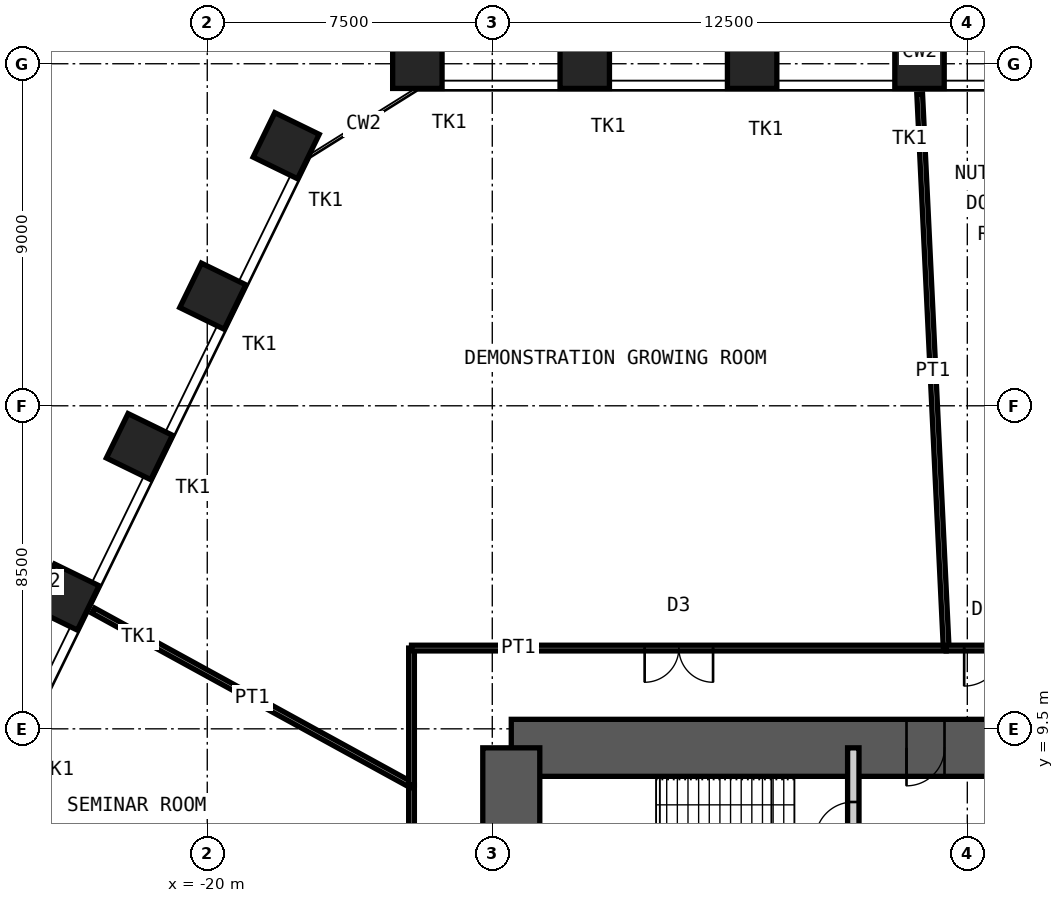
"""IFC4 building model, lengths in metres.
Left out: names, types, materials, properties, quantities, classifications, styles, units other than length and angle.
Written with IfcOpenShell. Run it as: python <this file> out.ifc"""

import sys

from ifc_helpers import new_model, si_unit, direction, frame, frame_2d, origin, origin_2d, place, context, subcontext, project, spatial, rectangle, hollow_rectangle, extrude, element, fill, save


model = new_model("IFC4")
c1 = context("Model", 3, precision=1e-05, world=origin(), true_north=direction((0.0, 1.0)))
c2 = subcontext(c1, "Body", "Model", "MODEL_VIEW")
j1 = project(units=[si_unit("LENGTHUNIT", "METRE"), si_unit("PLANEANGLEUNIT", "RADIAN")], contexts=[c1])
p1 = place(None, origin())
s1 = spatial("IfcSite", under=j1, at=p1, CompositionType="ELEMENT")
p2 = place(p1, origin())
s2 = spatial("IfcBuilding", under=s1, at=p2, CompositionType="ELEMENT")
p3 = place(p2, frame((0.0, 0.0, 92.0)))
s3 = spatial("IfcBuildingStorey", under=s2, at=p3, CompositionType="ELEMENT", Elevation=92.0)
for number, where, z_axis, x_axis in (
    (1, (-14.471, 27.0, 0.0), (0.0, 0.0, 1.0), (-1.0, 0.0, 0.0)),
    (2, (-10.067, 27.0, 0.0), (0.0, 0.0, 1.0), (-1.0, 0.0, 0.0)),
    (3, (-5.662, 27.0, 0.0), (0.0, 0.0, 1.0), (-1.0, 0.0, 0.0)),
    (4, (-1.258, 27.0, 0.0), (0.0, 0.0, 1.0), (-1.0, 0.0, 0.0)),
    (5, (-23.716, 12.966, 0.0), (0.0, 0.0, 1.0), (-0.438, -0.899, 0.0)),
    (6, (-21.785, 16.925, 0.0), (0.0, 0.0, 1.0), (-0.438, -0.899, 0.0)),
    (7, (-19.854, 20.884, 0.0), (0.0, 0.0, 1.0), (-0.438, -0.899, 0.0)),
    (8, (-17.924, 24.843, 0.0), (0.0, 0.0, 1.0), (-0.438, -0.899, 0.0)),
):
    element("IfcColumn", number, at=place(p3, frame(where, z_axis=z_axis, x_axis=x_axis)), inside=s3, PredefinedType="COLUMN", context=c2, shape_type="SweptSolid", body=[
        extrude(hollow_rectangle(XDim=1.3, YDim=1.3, WallThickness=0.1, at=origin_2d()), origin(), (0.0, 0.0, 1.0), 5.0),
    ])
p4 = place(p3, frame((-12.0, 9.0, 0.0), z_axis=(0.0, 0.0, 1.0), x_axis=(1.0, 0.0, 0.0)))
e9 = element("IfcWall", 9, at=p4, inside=s3, PredefinedType="SHEAR", context=c2, shape_type="SweptSolid", body=[
    extrude(rectangle(XDim=24.0, YDim=1.5, at=frame_2d((12.0, 0.0))), origin(), (0.0, 0.0, 1.0), 5.0),
])
p5 = place(p4, frame((10.4, 0.0, 0.0)))
e10 = element("IfcOpeningElement", 10, at=p5, cuts=e9, PredefinedType="OPENING", context=c2, shape_type="SweptSolid", body=[
    extrude(rectangle(XDim=1.0, YDim=2.1, at=frame_2d((0.5, 1.05))), frame((0.0, 0.76, 0.0), z_axis=(0.0, -1.0, 0.0), x_axis=(1.0, 0.0, 0.0)), (0.0, 0.0, 1.0), 1.52),
])
p6 = place(p4, frame((17.6, 0.0, 0.0)))
e11 = element("IfcOpeningElement", 11, at=p6, cuts=e9, PredefinedType="OPENING", context=c2, shape_type="SweptSolid", body=[
    extrude(rectangle(XDim=0.9, YDim=2.1, at=frame_2d((0.45, 1.05))), frame((0.0, 0.76, 0.0), z_axis=(0.0, -1.0, 0.0), x_axis=(1.0, 0.0, 0.0)), (0.0, 0.0, 1.0), 1.52),
])
p7 = place(p4, frame((21.9, 0.0, 0.0)))
e12 = element("IfcOpeningElement", 12, at=p7, cuts=e9, PredefinedType="OPENING", context=c2, shape_type="SweptSolid", body=[
    extrude(rectangle(XDim=0.9, YDim=2.1, at=frame_2d((0.45, 1.05))), frame((0.0, 0.76, 0.0), z_axis=(0.0, -1.0, 0.0), x_axis=(1.0, 0.0, 0.0)), (0.0, 0.0, 1.0), 1.52),
])
p8 = place(p3, frame((-12.0, -9.0, 0.0), z_axis=(0.0, 0.0, 1.0), x_axis=(0.0, 1.0, 0.0)))
e13 = element("IfcWall", 13, at=p8, inside=s3, PredefinedType="SHEAR", context=c2, shape_type="SweptSolid", body=[
    extrude(rectangle(XDim=18.0, YDim=1.5, at=frame_2d((9.0, 0.0))), origin(), (0.0, 0.0, 1.0), 5.0),
])
p9 = place(p8, frame((8.1, 0.0, 0.0)))
e14 = element("IfcOpeningElement", 14, at=p9, cuts=e13, PredefinedType="OPENING", context=c2, shape_type="SweptSolid", body=[
    extrude(rectangle(XDim=1.8, YDim=2.1, at=frame_2d((0.9, 1.05))), frame((0.0, 0.76, 0.0), z_axis=(0.0, -1.0, 0.0), x_axis=(1.0, 0.0, 0.0)), (0.0, 0.0, 1.0), 1.52),
])
p10 = place(p3, frame((-3.0, 5.15, 0.0), z_axis=(0.0, 0.0, 1.0), x_axis=(0.0, 1.0, 0.0)))
e15 = element("IfcWall", 15, at=p10, inside=s3, PredefinedType="PARTITIONING", context=c2, shape_type="SweptSolid", body=[
    extrude(rectangle(XDim=3.85, YDim=0.3, at=frame_2d((1.925, 0.0))), origin(), (0.0, 0.0, 1.0), 4.78),
])
p11 = place(p10, frame((1.425, 0.0, 0.0)))
e16 = element("IfcOpeningElement", 16, at=p11, cuts=e15, PredefinedType="OPENING", context=c2, shape_type="SweptSolid", body=[
    extrude(rectangle(XDim=1.0, YDim=2.1, at=frame_2d((0.5, 1.05))), frame((0.0, 0.16, 0.0), z_axis=(0.0, -1.0, 0.0), x_axis=(1.0, 0.0, 0.0)), (0.0, 0.0, 1.0), 0.32),
])
p12 = place(p3, frame((-14.625, 2.573, 0.0), z_axis=(0.0, 0.0, 1.0), x_axis=(0.0, 1.0, 0.0)))
e17 = element("IfcWall", 17, at=p12, inside=s3, PredefinedType="PARTITIONING", context=c2, shape_type="SweptSolid", body=[
    extrude(rectangle(XDim=5.446, YDim=0.15, at=frame_2d((2.723, 0.0))), origin(), (0.0, 0.0, 1.0), 4.72),
])
p13 = place(p12, frame((2.223, 0.0, 0.0)))
e18 = element("IfcOpeningElement", 18, at=p13, cuts=e17, PredefinedType="OPENING", context=c2, shape_type="SweptSolid", body=[
    extrude(rectangle(XDim=1.0, YDim=2.4, at=frame_2d((0.5, 1.2))), frame((0.0, 0.085, 0.0), z_axis=(0.0, -1.0, 0.0), x_axis=(1.0, 0.0, 0.0)), (0.0, 0.0, 1.0), 0.17),
])
p14 = place(p3, frame((-22.999, 12.612, 0.0), z_axis=(0.0, 0.0, 1.0), x_axis=(0.876825619135, -0.480808520752, 0.0)))
e19 = element("IfcWall", 19, at=p14, inside=s3, PredefinedType="PARTITIONING", context=c2, shape_type="SweptSolid", body=[
    extrude(rectangle(XDim=9.551, YDim=0.15, at=frame_2d((4.775, 0.0))), origin(), (0.0, 0.0, 1.0), 3.52),
])
p15 = place(p3, frame((-14.625, 8.02, 0.0), z_axis=(0.0, 0.0, 1.0), x_axis=(0.0, 1.0, 0.0)))
e20 = element("IfcWall", 20, at=p15, inside=s3, PredefinedType="PARTITIONING", context=c2, shape_type="SweptSolid", body=[
    extrude(rectangle(XDim=3.605, YDim=0.15, at=frame_2d((1.803, 0.0))), origin(), (0.0, 0.0, 1.0), 4.72),
])
p16 = place(p3, frame((-14.625, 11.625, 0.0), z_axis=(0.0, 0.0, 1.0), x_axis=(1.0, 0.0, 0.0)))
e21 = element("IfcWall", 21, at=p16, inside=s3, PredefinedType="PARTITIONING", context=c2, shape_type="SweptSolid", body=[
    extrude(rectangle(XDim=14.069, YDim=0.15, at=frame_2d((7.035, 0.0))), origin(), (0.0, 0.0, 1.0), 4.72),
])
p17 = place(p16, frame((6.135, 0.0, 0.0)))
e22 = element("IfcOpeningElement", 22, at=p17, cuts=e21, PredefinedType="OPENING", context=c2, shape_type="SweptSolid", body=[
    extrude(rectangle(XDim=1.8, YDim=2.4, at=frame_2d((0.9, 1.2))), frame((0.0, 0.085, 0.0), z_axis=(0.0, -1.0, 0.0), x_axis=(1.0, 0.0, 0.0)), (0.0, 0.0, 1.0), 0.17),
])
p18 = place(p3, frame((-1.253, 26.2, 0.0), z_axis=(0.0, 0.0, 1.0), x_axis=(0.047767854541, -0.998858464485, 0.0)))
e23 = element("IfcWall", 23, at=p18, inside=s3, PredefinedType="PARTITIONING", context=c2, shape_type="SweptSolid", body=[
    extrude(rectangle(XDim=14.592, YDim=0.15, at=frame_2d((7.296, 0.0))), origin(), (0.0, 0.0, 1.0), 3.82),
])
p19 = place(p3, frame((-0.556, 11.625, 0.0), z_axis=(0.0, 0.0, 1.0), x_axis=(1.0, 0.0, 0.0)))
e24 = element("IfcWall", 24, at=p19, inside=s3, PredefinedType="PARTITIONING", context=c2, shape_type="SweptSolid", body=[
    extrude(rectangle(XDim=1.947, YDim=0.15, at=frame_2d((0.974, 0.0))), origin(), (0.0, 0.0, 1.0), 4.72),
])
p20 = place(p19, frame((0.473, 0.0, 0.0)))
e25 = element("IfcOpeningElement", 25, at=p20, cuts=e24, PredefinedType="OPENING", context=c2, shape_type="SweptSolid", body=[
    extrude(rectangle(XDim=1.0, YDim=2.4, at=frame_2d((0.5, 1.2))), frame((0.0, 0.085, 0.0), z_axis=(0.0, -1.0, 0.0), x_axis=(1.0, 0.0, 0.0)), (0.0, 0.0, 1.0), 0.17),
])
p21 = place(p5, origin())
e26 = element("IfcDoor", 26, at=p21, inside=s3, OperationType="SINGLE_SWING_LEFT", PredefinedType="DOOR", context=c2, shape_type="SweptSolid", body=[
    extrude(rectangle(XDim=1.0, YDim=2.1, at=frame_2d((0.5, 1.05))), frame((0.0, 0.025, 0.0), z_axis=(0.0, -1.0, 0.0), x_axis=(1.0, 0.0, 0.0)), (0.0, 0.0, 1.0), 0.05),
])
fill(e10, e26)
p22 = place(p11, origin())
e27 = element("IfcDoor", 27, at=p22, inside=s3, OperationType="SINGLE_SWING_RIGHT", PredefinedType="DOOR", context=c2, shape_type="SweptSolid", body=[
    extrude(rectangle(XDim=1.0, YDim=2.1, at=frame_2d((0.5, 1.05))), frame((0.0, 0.025, 0.0), z_axis=(0.0, -1.0, 0.0), x_axis=(1.0, 0.0, 0.0)), (0.0, 0.0, 1.0), 0.05),
])
fill(e16, e27)
p23 = place(p17, origin())
e28 = element("IfcDoor", 28, at=p23, inside=s3, OperationType="DOUBLE_DOOR_DOUBLE_SWING", PredefinedType="DOOR", context=c2, shape_type="SweptSolid", body=[
    extrude(rectangle(XDim=1.8, YDim=2.4, at=frame_2d((0.9, 1.2))), frame((0.0, 0.025, 0.0), z_axis=(0.0, -1.0, 0.0), x_axis=(1.0, 0.0, 0.0)), (0.0, 0.0, 1.0), 0.05),
])
fill(e22, e28)
p24 = place(p20, origin())
e29 = element("IfcDoor", 29, at=p24, inside=s3, OperationType="SINGLE_SWING_LEFT", PredefinedType="DOOR", context=c2, shape_type="SweptSolid", body=[
    extrude(rectangle(XDim=1.0, YDim=2.4, at=frame_2d((0.5, 1.2))), frame((0.0, 0.025, 0.0), z_axis=(0.0, -1.0, 0.0), x_axis=(1.0, 0.0, 0.0)), (0.0, 0.0, 1.0), 0.05),
])
fill(e25, e29)
save(model, sys.argv[1])
